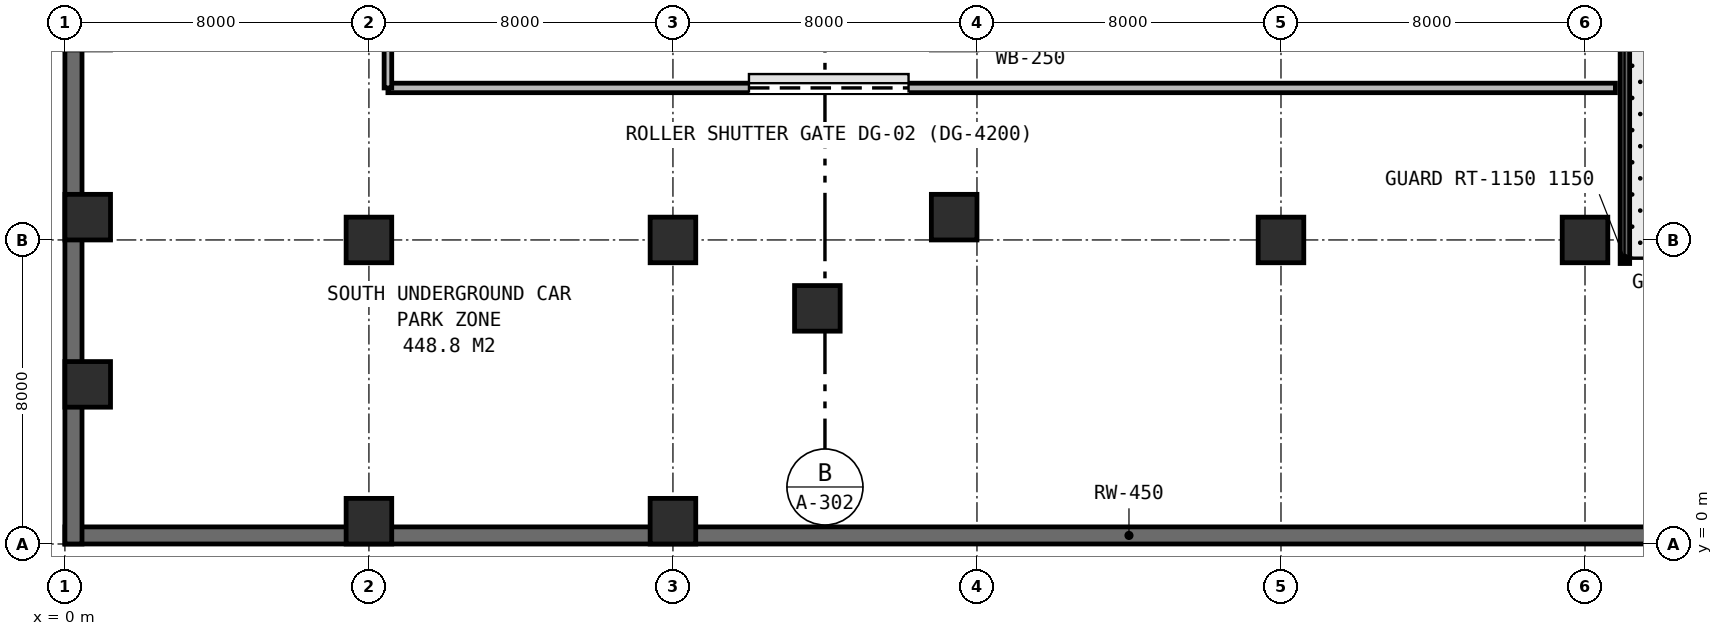
"""IFC4 building model, lengths in metres.
Left out: names, types, materials, properties, quantities, classifications, styles, units other than length and angle.
Written with IfcOpenShell. Run it as: python <this file> out.ifc"""

import sys

from ifc_helpers import new_model, si_unit, direction, frame, frame_2d, origin, origin_2d, place, context, subcontext, project, spatial, rectangle, extrude, element, fill, save


model = new_model("IFC4")
c1 = context("Model", 3, precision=1e-05, world=origin(), true_north=direction((0.0, 1.0)))
c2 = subcontext(c1, "Body", "Model", "MODEL_VIEW")
j1 = project(units=[si_unit("LENGTHUNIT", "METRE"), si_unit("PLANEANGLEUNIT", "RADIAN")], contexts=[c1])
p1 = place(None, origin())
s1 = spatial("IfcSite", under=j1, at=p1, CompositionType="ELEMENT")
p2 = place(p1, origin())
s2 = spatial("IfcBuilding", under=s1, at=p2, CompositionType="ELEMENT")
p3 = place(p2, frame((0.0, 0.0, -13.2)))
s3 = spatial("IfcBuildingStorey", under=s2, at=p3, CompositionType="ELEMENT", Elevation=-13.2)
p4 = place(p3, frame((0.0, 0.225, 0.0), z_axis=(0.0, 0.0, 1.0), x_axis=(1.0, 0.0, 0.0)))
e1 = element("IfcWall", 1, at=p4, inside=s3, PredefinedType="USERDEFINED", context=c2, shape_type="SweptSolid", body=[
    extrude(rectangle(XDim=56.0, YDim=0.45, at=frame_2d((28.0, 0.0))), origin(), (0.0, 0.0, 1.0), 3.8),
])
p5 = place(p3, frame((0.225, 0.0, 0.0), z_axis=(0.0, 0.0, 1.0), x_axis=(0.0, 1.0, 0.0)))
e2 = element("IfcWall", 2, at=p5, inside=s3, PredefinedType="USERDEFINED", context=c2, shape_type="SweptSolid", body=[
    extrude(rectangle(XDim=48.0, YDim=0.45, at=frame_2d((24.0, 0.0))), origin(), (0.0, 0.0, 1.0), 3.8),
])
for number, where, z_axis, x_axis in (
    (3, (0.6, 8.6, 0.0), (0.0, 0.0, 1.0), (1.0, 0.0, 0.0)),
    (4, (0.6, 4.2, 0.0), (0.0, 0.0, 1.0), (1.0, 0.0, 0.0)),
    (5, (8.0, 0.6, 0.0), (0.0, 0.0, 1.0), (1.0, 0.0, 0.0)),
    (6, (16.0, 0.6, 0.0), (0.0, 0.0, 1.0), (1.0, 0.0, 0.0)),
    (7, (19.8, 6.2, 0.0), (0.0, 0.0, 1.0), (1.0, 0.0, 0.0)),
    (8, (23.4, 8.6, 0.0), (0.0, 0.0, 1.0), (1.0, 0.0, 0.0)),
    (9, (8.0, 8.0, 0.0), (0.0, 0.0, 1.0), (1.0, 0.0, 0.0)),
    (10, (16.0, 8.0, 0.0), (0.0, 0.0, 1.0), (1.0, 0.0, 0.0)),
    (11, (32.0, 8.0, 0.0), (0.0, 0.0, 1.0), (1.0, 0.0, 0.0)),
    (12, (40.0, 8.0, 0.0), (0.0, 0.0, 1.0), (1.0, 0.0, 0.0)),
):
    element("IfcColumn", number, at=place(p3, frame(where, z_axis=z_axis, x_axis=x_axis)), inside=s3, PredefinedType="COLUMN", context=c2, shape_type="SweptSolid", body=[
        extrude(rectangle(XDim=1.2, YDim=1.2, at=origin_2d()), origin(), (0.0, 0.0, 1.0), 3.8),
    ])
p6 = place(p3, frame((8.5, 12.0, 0.0), z_axis=(0.0, 0.0, 1.0), x_axis=(1.0, 0.0, 0.0)))
e13 = element("IfcWall", 13, at=p6, inside=s3, PredefinedType="STANDARD", context=c2, shape_type="SweptSolid", body=[
    extrude(rectangle(XDim=32.3, YDim=0.25, at=frame_2d((16.15, 0.0))), origin(), (0.0, 0.0, 1.0), 3.15),
])
p7 = place(p6, frame((9.5, 0.0, 0.0)))
e14 = element("IfcOpeningElement", 14, at=p7, cuts=e13, PredefinedType="OPENING", context=c2, shape_type="SweptSolid", body=[
    extrude(rectangle(XDim=4.2, YDim=2.95, at=frame_2d((2.1, 1.475))), frame((0.0, 0.135, 0.0), z_axis=(0.0, -1.0, 0.0), x_axis=(1.0, 0.0, 0.0)), (0.0, 0.0, 1.0), 0.27),
])
p8 = place(p3, frame((8.5, 12.0, 0.0), z_axis=(0.0, 0.0, 1.0), x_axis=(0.0, 1.0, 0.0)))
e15 = element("IfcWall", 15, at=p8, inside=s3, PredefinedType="PARTITIONING", context=c2, shape_type="SweptSolid", body=[
    extrude(rectangle(XDim=35.45, YDim=0.2, at=frame_2d((17.725, 0.0))), origin(), (0.0, 0.0, 1.0), 2.63),
])
p9 = place(p8, frame((16.574, 0.0, 0.0)))
e16 = element("IfcOpeningElement", 16, at=p9, cuts=e15, PredefinedType="OPENING", context=c2, shape_type="SweptSolid", body=[
    extrude(rectangle(XDim=1.0, YDim=2.15, at=frame_2d((0.5, 1.075))), frame((0.0, 0.11, 0.0), z_axis=(0.0, -1.0, 0.0), x_axis=(1.0, 0.0, 0.0)), (0.0, 0.0, 1.0), 0.22),
])
p10 = place(p3, frame((41.05, 7.38, 0.0), z_axis=(0.0, 0.0, 1.0), x_axis=(0.0, 1.0, 0.0)))
e17 = element("IfcWall", 17, at=p10, inside=s3, PredefinedType="STANDARD", context=c2, shape_type="SweptSolid", body=[
    extrude(rectangle(XDim=16.48, YDim=0.25, at=frame_2d((8.24, 0.0))), origin(), (0.0, 0.0, 1.0), 3.5),
])
p11 = place(p7, origin())
e18 = element("IfcDoor", 18, at=p11, inside=s3, OperationType="ROLLINGUP", PredefinedType="GATE", context=c2, shape_type="SweptSolid", body=[
    extrude(rectangle(XDim=4.2, YDim=2.95, at=frame_2d((2.1, 1.475))), frame((0.0, 0.025, 0.0), z_axis=(0.0, -1.0, 0.0), x_axis=(1.0, 0.0, 0.0)), (0.0, 0.0, 1.0), 0.05),
])
fill(e14, e18)
save(model, sys.argv[1])
